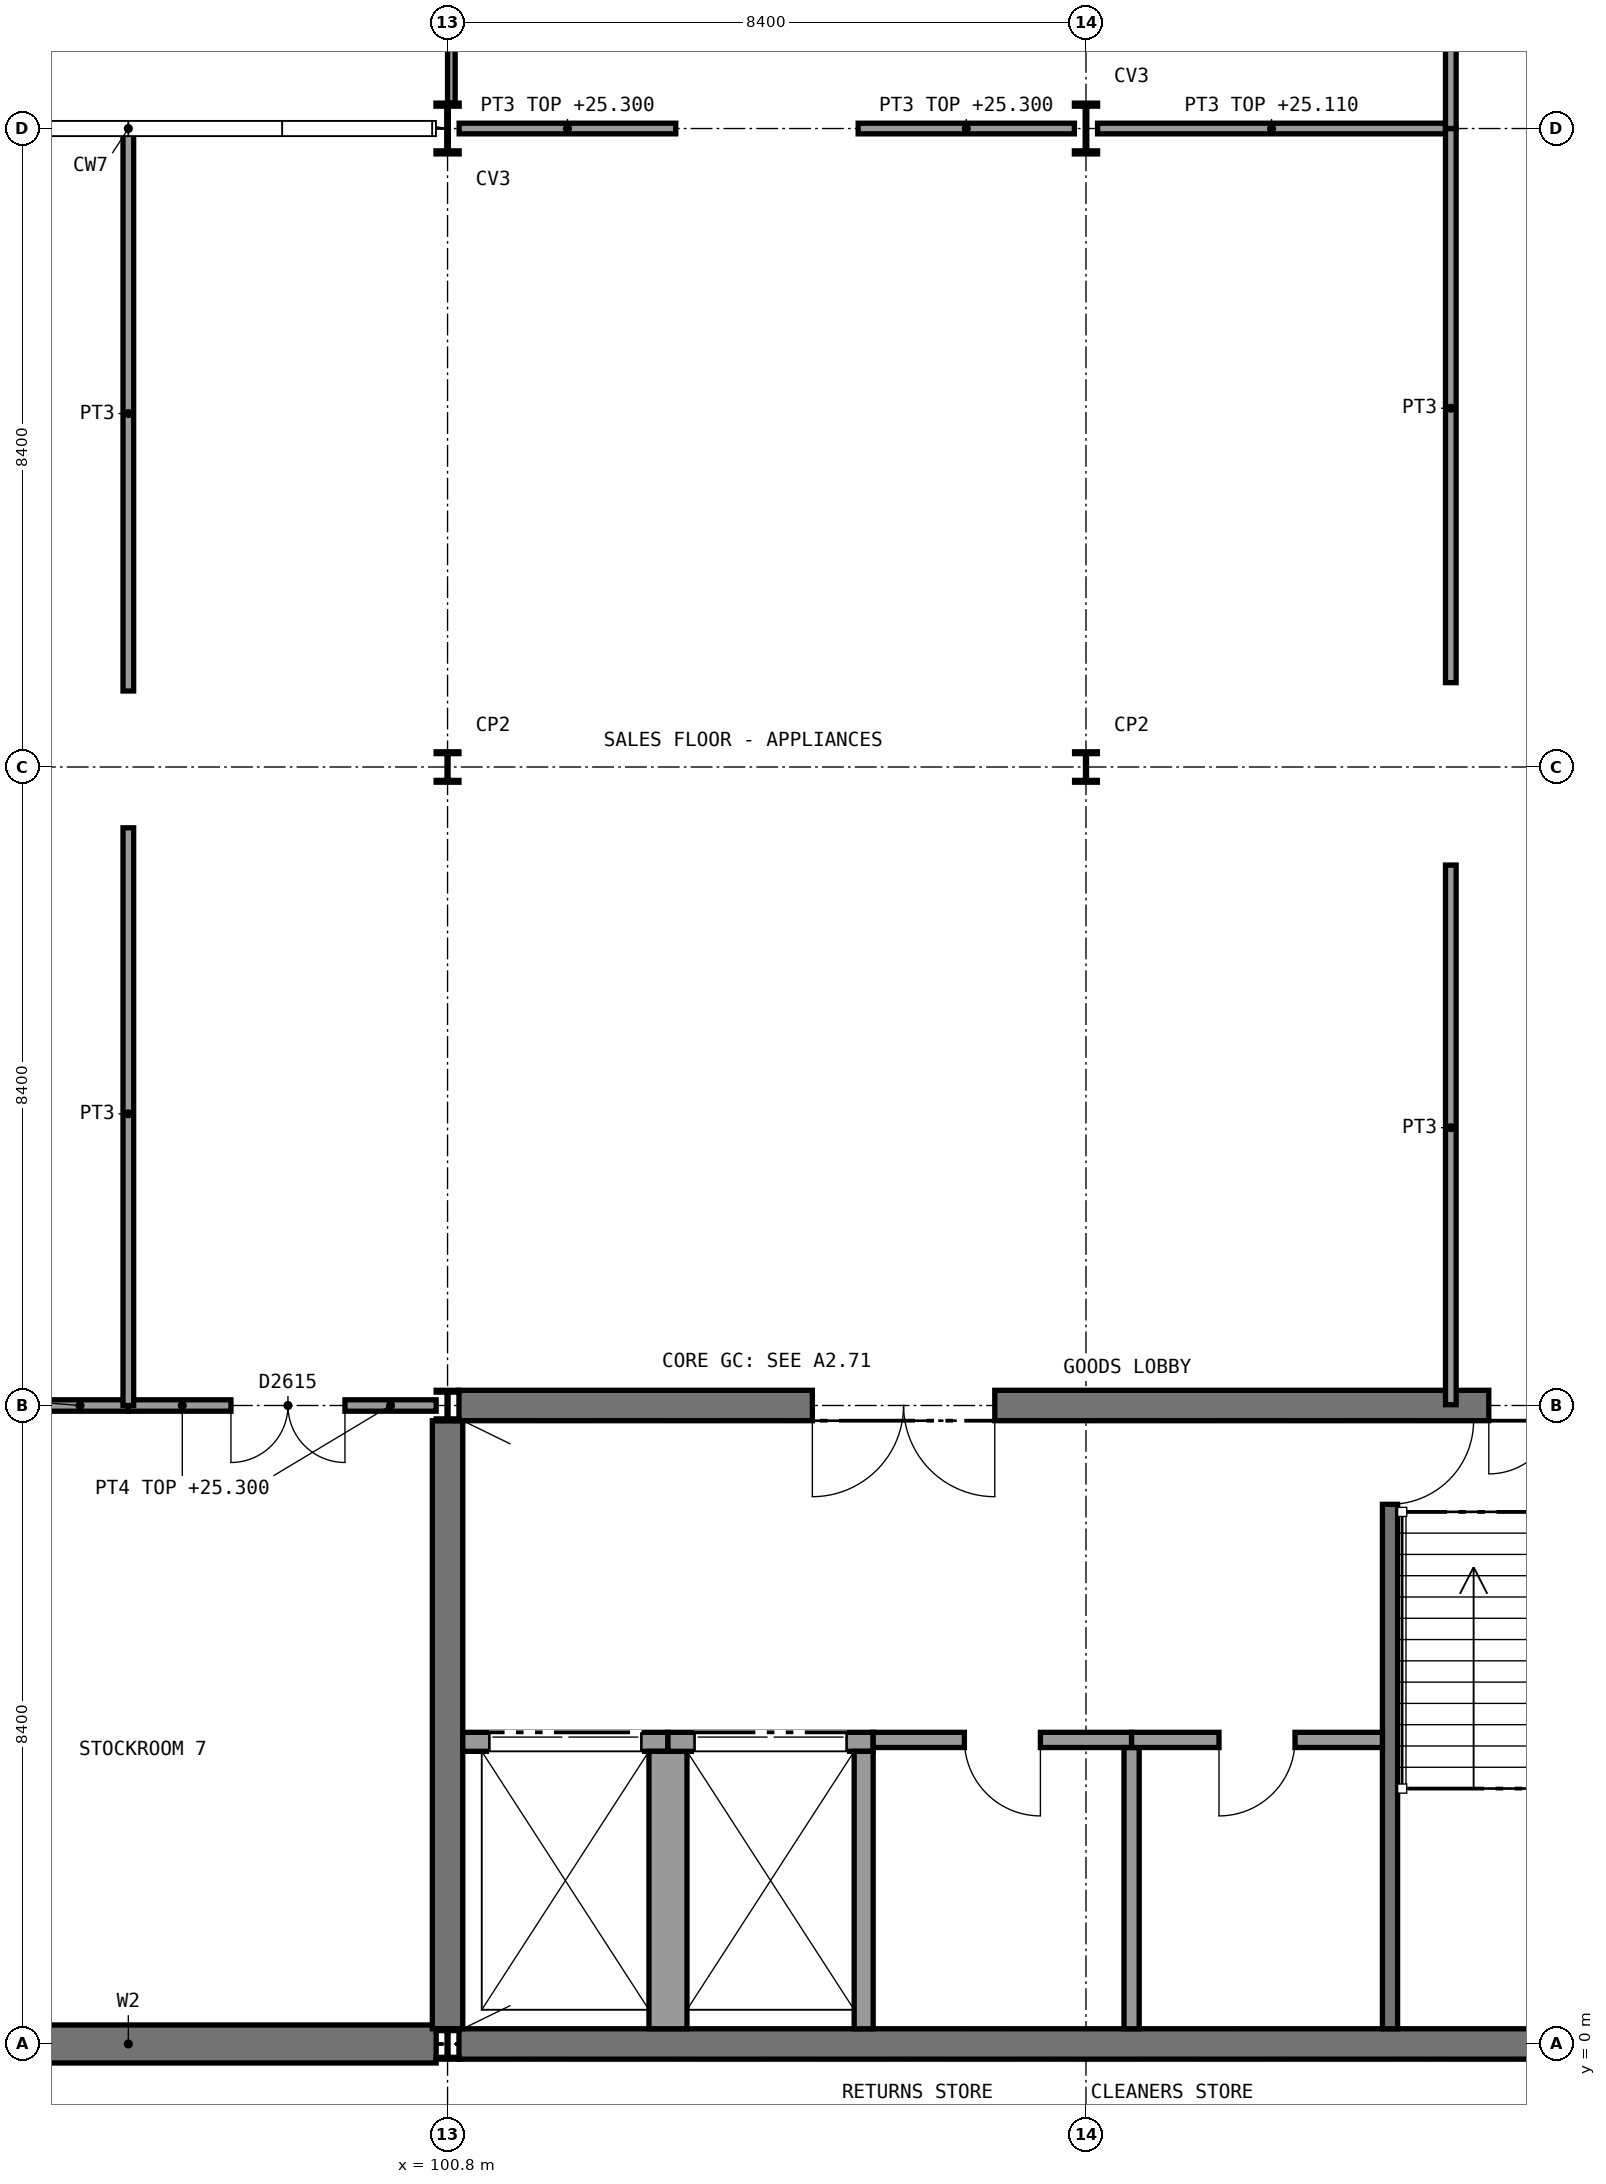
"""IFC4 building model, lengths in metres.
Left out: names, types, materials, properties, quantities, classifications, styles, units other than length and angle.
Written with IfcOpenShell. Run it as: python <this file> out.ifc"""

import sys

from ifc_helpers import new_model, si_unit, direction, frame, frame_2d, origin, origin_2d, place, context, subcontext, project, spatial, rectangle, i_section, extrude, element, fill, save


model = new_model("IFC4")
c1 = context("Model", 3, precision=1e-05, world=origin(), true_north=direction((0.0, 1.0)))
c2 = subcontext(c1, "Body", "Model", "MODEL_VIEW")
j1 = project(units=[si_unit("LENGTHUNIT", "METRE"), si_unit("PLANEANGLEUNIT", "RADIAN")], contexts=[c1])
p1 = place(None, origin())
s1 = spatial("IfcSite", under=j1, at=p1, CompositionType="ELEMENT")
p2 = place(p1, origin())
s2 = spatial("IfcBuilding", under=s1, at=p2, CompositionType="ELEMENT")
p3 = place(p2, frame((0.0, 0.0, 21.0)))
s3 = spatial("IfcBuildingStorey", under=s2, at=p3, CompositionType="ELEMENT", Elevation=21.0)
p4 = place(p3, frame((92.55, 0.0, 0.0), z_axis=(0.0, 0.0, 1.0), x_axis=(1.0, 0.0, 0.0)))
e1 = element("IfcWall", 1, at=p4, inside=s3, PredefinedType="SHEAR", context=c2, shape_type="SweptSolid", body=[
    extrude(rectangle(XDim=8.1, YDim=0.5, at=frame_2d((4.05, 0.0))), origin(), (0.0, 0.0, 1.0), 4.65),
])
p5 = place(p3, frame((100.95, 0.0, 0.0), z_axis=(0.0, 0.0, 1.0), x_axis=(1.0, 0.0, 0.0)))
e2 = element("IfcWall", 2, at=p5, inside=s3, PredefinedType="SHEAR", context=c2, shape_type="SweptSolid", body=[
    extrude(rectangle(XDim=16.45, YDim=0.4, at=frame_2d((8.225, 0.0))), origin(), (0.0, 0.0, 1.0), 4.65),
])
p6 = place(p3, frame((100.95, 8.4, 0.0), z_axis=(0.0, 0.0, 1.0), x_axis=(1.0, 0.0, 0.0)))
e3 = element("IfcWall", 3, at=p6, inside=s3, PredefinedType="SHEAR", context=c2, shape_type="SweptSolid", body=[
    extrude(rectangle(XDim=16.45, YDim=0.4, at=frame_2d((8.225, 0.0))), origin(), (0.0, 0.0, 1.0), 4.65),
])
p7 = place(p6, frame((13.55, 0.0, 0.0)))
e4 = element("IfcOpeningElement", 4, at=p7, cuts=e3, PredefinedType="OPENING", context=c2, shape_type="SweptSolid", body=[
    extrude(rectangle(XDim=1.8, YDim=2.1, at=frame_2d((0.9, 1.05))), frame((0.0, 0.21, 0.0), z_axis=(0.0, -1.0, 0.0), x_axis=(1.0, 0.0, 0.0)), (0.0, 0.0, 1.0), 0.42),
])
p8 = place(p6, frame((4.65, 0.0, 0.0)))
e5 = element("IfcOpeningElement", 5, at=p8, cuts=e3, PredefinedType="OPENING", context=c2, shape_type="SweptSolid", body=[
    extrude(rectangle(XDim=2.4, YDim=2.4, at=frame_2d((1.2, 1.2))), frame((0.0, 0.21, 0.0), z_axis=(0.0, -1.0, 0.0), x_axis=(1.0, 0.0, 0.0)), (0.0, 0.0, 1.0), 0.42),
])
p9 = place(p3, frame((100.8, 0.2, 0.0), z_axis=(0.0, 0.0, 1.0), x_axis=(0.0, 1.0, 0.0)))
e6 = element("IfcWall", 6, at=p9, inside=s3, PredefinedType="SHEAR", context=c2, shape_type="SweptSolid", body=[
    extrude(rectangle(XDim=8.0, YDim=0.4, at=frame_2d((4.0, 0.0))), origin(), (0.0, 0.0, 1.0), 4.65),
])
for number, where, z_axis, x_axis in (
    (7, (100.8, 0.0, 0.0), (0.0, 0.0, 1.0), (1.0, 0.0, 0.0)),
    (8, (100.8, 8.4, 0.0), (0.0, 0.0, 1.0), (1.0, 0.0, 0.0)),
    (9, (100.8, 16.8, 0.0), (0.0, 0.0, 1.0), (1.0, 0.0, 0.0)),
):
    element("IfcColumn", number, at=place(p3, frame(where, z_axis=z_axis, x_axis=x_axis)), inside=s3, PredefinedType="COLUMN", context=c2, shape_type="SweptSolid", body=[
        extrude(i_section(OverallWidth=0.3, OverallDepth=0.4, WebThickness=0.013, FlangeThickness=0.024, FilletRadius=0.027, at=origin_2d()), origin(), (0.0, 0.0, 1.0), 4.8),
    ])
p10 = place(p3, frame((100.8, 25.2, 0.0), z_axis=(0.0, 0.0, 1.0), x_axis=(1.0, 0.0, 0.0)))
e10 = element("IfcColumn", 10, at=p10, inside=s3, PredefinedType="COLUMN", context=c2, shape_type="SweptSolid", body=[
    extrude(i_section(OverallWidth=0.305, OverallDepth=0.668, WebThickness=0.021, FlangeThickness=0.04, FilletRadius=0.027, at=origin_2d()), origin(), (0.0, 0.0, 1.0), 4.8),
])
p11 = place(p3, frame((109.2, 16.8, 0.0), z_axis=(0.0, 0.0, 1.0), x_axis=(1.0, 0.0, 0.0)))
e11 = element("IfcColumn", 11, at=p11, inside=s3, PredefinedType="COLUMN", context=c2, shape_type="SweptSolid", body=[
    extrude(i_section(OverallWidth=0.3, OverallDepth=0.4, WebThickness=0.013, FlangeThickness=0.024, FilletRadius=0.027, at=origin_2d()), origin(), (0.0, 0.0, 1.0), 4.8),
])
p12 = place(p3, frame((109.2, 25.2, 0.0), z_axis=(0.0, 0.0, 1.0), x_axis=(1.0, 0.0, 0.0)))
e12 = element("IfcColumn", 12, at=p12, inside=s3, PredefinedType="COLUMN", context=c2, shape_type="SweptSolid", body=[
    extrude(i_section(OverallWidth=0.305, OverallDepth=0.668, WebThickness=0.021, FlangeThickness=0.04, FilletRadius=0.027, at=origin_2d()), origin(), (0.0, 0.0, 1.0), 4.8),
])
p13 = place(p3, frame((92.55, 8.4, 0.0), z_axis=(0.0, 0.0, 1.0), x_axis=(1.0, 0.0, 0.0)))
e13 = element("IfcWall", 13, at=p13, inside=s3, PredefinedType="SOLIDWALL", context=c2, shape_type="SweptSolid", body=[
    extrude(rectangle(XDim=4.05, YDim=0.15, at=frame_2d((2.025, 0.0))), origin(), (0.0, 0.0, 1.0), 4.3),
])
p14 = place(p13, frame((1.35, 0.0, 0.0)))
e14 = element("IfcOpeningElement", 14, at=p14, cuts=e13, PredefinedType="OPENING", context=c2, shape_type="SweptSolid", body=[
    extrude(rectangle(XDim=1.5, YDim=2.1, at=frame_2d((0.75, 1.05))), frame((0.0, 0.085, 0.0), z_axis=(0.0, -1.0, 0.0), x_axis=(1.0, 0.0, 0.0)), (0.0, 0.0, 1.0), 0.17),
])
p15 = place(p3, frame((96.6, 8.4, 0.0), z_axis=(0.0, 0.0, 1.0), x_axis=(1.0, 0.0, 0.0)))
e15 = element("IfcWall", 15, at=p15, inside=s3, PredefinedType="SOLIDWALL", context=c2, shape_type="SweptSolid", body=[
    extrude(rectangle(XDim=4.05, YDim=0.15, at=frame_2d((2.025, 0.0))), origin(), (0.0, 0.0, 1.0), 4.3),
])
p16 = place(p15, frame((1.35, 0.0, 0.0)))
e16 = element("IfcOpeningElement", 16, at=p16, cuts=e15, PredefinedType="OPENING", context=c2, shape_type="SweptSolid", body=[
    extrude(rectangle(XDim=1.5, YDim=2.1, at=frame_2d((0.75, 1.05))), frame((0.0, 0.085, 0.0), z_axis=(0.0, -1.0, 0.0), x_axis=(1.0, 0.0, 0.0)), (0.0, 0.0, 1.0), 0.17),
])
p17 = place(p3, frame((96.6, 8.4, 0.0), z_axis=(0.0, 0.0, 1.0), x_axis=(0.0, 1.0, 0.0)))
e17 = element("IfcWall", 17, at=p17, inside=s3, PredefinedType="PARTITIONING", context=c2, shape_type="SweptSolid", body=[
    extrude(rectangle(XDim=7.6, YDim=0.14, at=frame_2d((3.8, 0.0))), origin(), (0.0, 0.0, 1.0), 4.65),
])
p18 = place(p3, frame((96.6, 17.8, 0.0), z_axis=(0.0, 0.0, 1.0), x_axis=(0.0, 1.0, 0.0)))
e18 = element("IfcWall", 18, at=p18, inside=s3, PredefinedType="PARTITIONING", context=c2, shape_type="SweptSolid", body=[
    extrude(rectangle(XDim=7.4, YDim=0.14, at=frame_2d((3.7, 0.0))), origin(), (0.0, 0.0, 1.0), 4.65),
])
p19 = place(p3, frame((100.953, 25.2, 0.0), z_axis=(0.0, 0.0, 1.0), x_axis=(1.0, 0.0, 0.0)))
e19 = element("IfcWall", 19, at=p19, inside=s3, PredefinedType="PARTITIONING", context=c2, shape_type="SweptSolid", body=[
    extrude(rectangle(XDim=2.85, YDim=0.14, at=frame_2d((1.425, 0.0))), origin(), (0.0, 0.0, 1.0), 4.3),
])
p20 = place(p3, frame((106.203, 25.2, 0.0), z_axis=(0.0, 0.0, 1.0), x_axis=(1.0, 0.0, 0.0)))
e20 = element("IfcWall", 20, at=p20, inside=s3, PredefinedType="PARTITIONING", context=c2, shape_type="SweptSolid", body=[
    extrude(rectangle(XDim=2.845, YDim=0.14, at=frame_2d((1.422, 0.0))), origin(), (0.0, 0.0, 1.0), 4.3),
])
p21 = place(p3, frame((109.353, 25.2, 0.0), z_axis=(0.0, 0.0, 1.0), x_axis=(1.0, 0.0, 0.0)))
e21 = element("IfcWall", 21, at=p21, inside=s3, PredefinedType="PARTITIONING", context=c2, shape_type="SweptSolid", body=[
    extrude(rectangle(XDim=4.647, YDim=0.14, at=frame_2d((2.324, 0.0))), origin(), (0.0, 0.0, 1.0), 4.11),
])
p22 = place(p3, frame((114.0, 8.41, 0.0), z_axis=(0.0, 0.0, 1.0), x_axis=(0.0, 1.0, 0.0)))
e22 = element("IfcWall", 22, at=p22, inside=s3, PredefinedType="PARTITIONING", context=c2, shape_type="SweptSolid", body=[
    extrude(rectangle(XDim=7.1, YDim=0.14, at=frame_2d((3.55, 0.0))), origin(), (0.0, 0.0, 1.0), 4.65),
])
p23 = place(p3, frame((114.0, 17.91, 0.0), z_axis=(0.0, 0.0, 1.0), x_axis=(0.0, 1.0, 0.0)))
e23 = element("IfcWall", 23, at=p23, inside=s3, PredefinedType="PARTITIONING", context=c2, shape_type="SweptSolid", body=[
    extrude(rectangle(XDim=7.29, YDim=0.14, at=frame_2d((3.645, 0.0))), origin(), (0.0, 0.0, 1.0), 4.65),
])
p24 = place(p3, frame((114.0, 25.2, 0.0), z_axis=(0.0, 0.0, 1.0), x_axis=(0.0, 1.0, 0.0)))
e24 = element("IfcWall", 24, at=p24, inside=s3, PredefinedType="PARTITIONING", context=c2, shape_type="SweptSolid", body=[
    extrude(rectangle(XDim=12.6, YDim=0.14, at=frame_2d((6.3, 0.0))), origin(), (0.0, 0.0, 1.0), 4.65),
])
p25 = place(p3, frame((113.2, 0.2, 0.0), z_axis=(0.0, 0.0, 1.0), x_axis=(0.0, 1.0, 0.0)))
e25 = element("IfcWall", 25, at=p25, inside=s3, PredefinedType="SHEAR", context=c2, shape_type="SweptSolid", body=[
    extrude(rectangle(XDim=8.0, YDim=0.2, at=frame_2d((4.0, 0.0))), origin(), (0.0, 0.0, 1.0), 4.65),
])
p26 = place(p25, frame((6.9, 0.0, 0.0)))
e26 = element("IfcOpeningElement", 26, at=p26, cuts=e25, PredefinedType="OPENING", context=c2, shape_type="SweptSolid", body=[
    extrude(rectangle(XDim=1.11, YDim=2.1, at=frame_2d((0.555, 1.05))), frame((0.0, 0.11, 0.0), z_axis=(0.0, -1.0, 0.0), x_axis=(1.0, 0.0, 0.0)), (0.0, 0.0, 1.0), 0.22),
])
p27 = place(p3, frame((101.0, 3.975, 0.0), z_axis=(0.0, 0.0, 1.0), x_axis=(1.0, 0.0, 0.0)))
e27 = element("IfcWall", 27, at=p27, inside=s3, PredefinedType="SOLIDWALL", context=c2, shape_type="SweptSolid", body=[
    extrude(rectangle(XDim=2.7, YDim=0.25, at=frame_2d((1.35, 0.0))), origin(), (0.0, 0.0, 1.0), 4.8),
])
p28 = place(p27, frame((0.35, 0.0, 0.0)))
e28 = element("IfcOpeningElement", 28, at=p28, cuts=e27, PredefinedType="OPENING", context=c2, shape_type="SweptSolid", body=[
    extrude(rectangle(XDim=2.0, YDim=2.2, at=frame_2d((1.0, 1.1))), frame((0.0, 0.135, 0.0), z_axis=(0.0, -1.0, 0.0), x_axis=(1.0, 0.0, 0.0)), (0.0, 0.0, 1.0), 0.27),
])
p29 = place(p3, frame((103.7, 0.2, 0.0), z_axis=(0.0, 0.0, 1.0), x_axis=(0.0, 1.0, 0.0)))
e29 = element("IfcWall", 29, at=p29, inside=s3, PredefinedType="SOLIDWALL", context=c2, shape_type="SweptSolid", body=[
    extrude(rectangle(XDim=3.65, YDim=0.5, at=frame_2d((1.825, 0.0))), origin(), (0.0, 0.0, 1.0), 4.8),
])
p30 = place(p3, frame((103.7, 3.975, 0.0), z_axis=(0.0, 0.0, 1.0), x_axis=(1.0, 0.0, 0.0)))
e30 = element("IfcWall", 30, at=p30, inside=s3, PredefinedType="SOLIDWALL", context=c2, shape_type="SweptSolid", body=[
    extrude(rectangle(XDim=2.7, YDim=0.25, at=frame_2d((1.35, 0.0))), origin(), (0.0, 0.0, 1.0), 4.8),
])
p31 = place(p30, frame((0.35, 0.0, 0.0)))
e31 = element("IfcOpeningElement", 31, at=p31, cuts=e30, PredefinedType="OPENING", context=c2, shape_type="SweptSolid", body=[
    extrude(rectangle(XDim=2.0, YDim=2.2, at=frame_2d((1.0, 1.1))), frame((0.0, 0.135, 0.0), z_axis=(0.0, -1.0, 0.0), x_axis=(1.0, 0.0, 0.0)), (0.0, 0.0, 1.0), 0.27),
])
p32 = place(p3, frame((106.275, 0.2, 0.0), z_axis=(0.0, 0.0, 1.0), x_axis=(0.0, 1.0, 0.0)))
e32 = element("IfcWall", 32, at=p32, inside=s3, PredefinedType="SOLIDWALL", context=c2, shape_type="SweptSolid", body=[
    extrude(rectangle(XDim=3.65, YDim=0.25, at=frame_2d((1.825, 0.0))), origin(), (0.0, 0.0, 1.0), 4.8),
])
p33 = place(p3, frame((106.4, 4.0, 0.0), z_axis=(0.0, 0.0, 1.0), x_axis=(1.0, 0.0, 0.0)))
e33 = element("IfcWall", 33, at=p33, inside=s3, PredefinedType="PARTITIONING", context=c2, shape_type="SweptSolid", body=[
    extrude(rectangle(XDim=3.4, YDim=0.2, at=frame_2d((1.7, 0.0))), origin(), (0.0, 0.0, 1.0), 4.65),
])
p34 = place(p33, frame((1.2, 0.0, 0.0)))
e34 = element("IfcOpeningElement", 34, at=p34, cuts=e33, PredefinedType="OPENING", context=c2, shape_type="SweptSolid", body=[
    extrude(rectangle(XDim=1.0, YDim=2.1, at=frame_2d((0.5, 1.05))), frame((0.0, 0.11, 0.0), z_axis=(0.0, -1.0, 0.0), x_axis=(1.0, 0.0, 0.0)), (0.0, 0.0, 1.0), 0.22),
])
p35 = place(p3, frame((109.8, 0.2, 0.0), z_axis=(0.0, 0.0, 1.0), x_axis=(0.0, 1.0, 0.0)))
e35 = element("IfcWall", 35, at=p35, inside=s3, PredefinedType="PARTITIONING", context=c2, shape_type="SweptSolid", body=[
    extrude(rectangle(XDim=3.7, YDim=0.2, at=frame_2d((1.85, 0.0))), origin(), (0.0, 0.0, 1.0), 4.65),
])
p36 = place(p3, frame((109.8, 4.0, 0.0), z_axis=(0.0, 0.0, 1.0), x_axis=(1.0, 0.0, 0.0)))
e36 = element("IfcWall", 36, at=p36, inside=s3, PredefinedType="PARTITIONING", context=c2, shape_type="SweptSolid", body=[
    extrude(rectangle(XDim=3.3, YDim=0.2, at=frame_2d((1.65, 0.0))), origin(), (0.0, 0.0, 1.0), 4.65),
])
p37 = place(p36, frame((1.15, 0.0, 0.0)))
e37 = element("IfcOpeningElement", 37, at=p37, cuts=e36, PredefinedType="OPENING", context=c2, shape_type="SweptSolid", body=[
    extrude(rectangle(XDim=1.0, YDim=2.1, at=frame_2d((0.5, 1.05))), frame((0.0, 0.11, 0.0), z_axis=(0.0, -1.0, 0.0), x_axis=(1.0, 0.0, 0.0)), (0.0, 0.0, 1.0), 0.22),
])
p38 = place(p3, frame((100.85, 25.534, 0.0), z_axis=(0.0, 0.0, 1.0), x_axis=(0.0, 1.0, 0.0)))
e38 = element("IfcWall", 38, at=p38, inside=s3, PredefinedType="PARTITIONING", context=c2, shape_type="SweptSolid", body=[
    extrude(rectangle(XDim=12.027, YDim=0.1, at=frame_2d((6.014, 0.0))), origin(), (0.0, 0.0, 1.0), 3.76),
])
p39 = place(p16, frame((1.5, 0.0, 0.0), z_axis=(0.0, 0.0, 1.0), x_axis=(-1.0, 0.0, 0.0)))
e39 = element("IfcDoor", 39, at=p39, inside=s3, OperationType="DOUBLE_DOOR_SINGLE_SWING", PredefinedType="DOOR", context=c2, shape_type="SweptSolid", body=[
    extrude(rectangle(XDim=1.5, YDim=2.1, at=frame_2d((0.75, 1.05))), frame((0.0, 0.025, 0.0), z_axis=(0.0, -1.0, 0.0), x_axis=(1.0, 0.0, 0.0)), (0.0, 0.0, 1.0), 0.05),
])
fill(e16, e39)
p40 = place(p26, frame((1.1, 0.0, 0.0), z_axis=(0.0, 0.0, 1.0), x_axis=(-1.0, 0.0, 0.0)))
e40 = element("IfcDoor", 40, at=p40, inside=s3, OperationType="SINGLE_SWING_LEFT", PredefinedType="DOOR", context=c2, shape_type="SweptSolid", body=[
    extrude(rectangle(XDim=1.1, YDim=2.1, at=frame_2d((0.55, 1.05))), frame((0.0, 0.025, 0.0), z_axis=(0.0, -1.0, 0.0), x_axis=(1.0, 0.0, 0.0)), (0.0, 0.0, 1.0), 0.05),
])
fill(e26, e40)
p41 = place(p28, origin())
e41 = element("IfcDoor", 41, at=p41, inside=s3, OperationType="DOUBLE_DOOR_SLIDING", PredefinedType="DOOR", context=c2, shape_type="SweptSolid", body=[
    extrude(rectangle(XDim=2.0, YDim=2.2, at=frame_2d((1.0, 1.1))), frame((0.0, 0.025, 0.0), z_axis=(0.0, -1.0, 0.0), x_axis=(1.0, 0.0, 0.0)), (0.0, 0.0, 1.0), 0.05),
])
fill(e28, e41)
p42 = place(p31, origin())
e42 = element("IfcDoor", 42, at=p42, inside=s3, OperationType="DOUBLE_DOOR_SLIDING", PredefinedType="DOOR", context=c2, shape_type="SweptSolid", body=[
    extrude(rectangle(XDim=2.0, YDim=2.2, at=frame_2d((1.0, 1.1))), frame((0.0, 0.025, 0.0), z_axis=(0.0, -1.0, 0.0), x_axis=(1.0, 0.0, 0.0)), (0.0, 0.0, 1.0), 0.05),
])
fill(e31, e42)
p43 = place(p34, frame((1.0, 0.0, 0.0), z_axis=(0.0, 0.0, 1.0), x_axis=(-1.0, 0.0, 0.0)))
e43 = element("IfcDoor", 43, at=p43, inside=s3, OperationType="SINGLE_SWING_LEFT", PredefinedType="DOOR", context=c2, shape_type="SweptSolid", body=[
    extrude(rectangle(XDim=1.0, YDim=2.1, at=frame_2d((0.5, 1.05))), frame((0.0, 0.025, 0.0), z_axis=(0.0, -1.0, 0.0), x_axis=(1.0, 0.0, 0.0)), (0.0, 0.0, 1.0), 0.05),
])
fill(e34, e43)
p44 = place(p37, frame((1.0, 0.0, 0.0), z_axis=(0.0, 0.0, 1.0), x_axis=(-1.0, 0.0, 0.0)))
e44 = element("IfcDoor", 44, at=p44, inside=s3, OperationType="SINGLE_SWING_RIGHT", PredefinedType="DOOR", context=c2, shape_type="SweptSolid", body=[
    extrude(rectangle(XDim=1.0, YDim=2.1, at=frame_2d((0.5, 1.05))), frame((0.0, 0.025, 0.0), z_axis=(0.0, -1.0, 0.0), x_axis=(1.0, 0.0, 0.0)), (0.0, 0.0, 1.0), 0.05),
])
fill(e37, e44)
p45 = place(p7, frame((1.8, 0.0, 0.0), z_axis=(0.0, 0.0, 1.0), x_axis=(-1.0, 0.0, 0.0)))
e45 = element("IfcDoor", 45, at=p45, inside=s3, OperationType="DOUBLE_DOOR_SINGLE_SWING", PredefinedType="DOOR", context=c2, shape_type="SweptSolid", body=[
    extrude(rectangle(XDim=1.8, YDim=2.1, at=frame_2d((0.9, 1.05))), frame((0.0, 0.025, 0.0), z_axis=(0.0, -1.0, 0.0), x_axis=(1.0, 0.0, 0.0)), (0.0, 0.0, 1.0), 0.05),
])
fill(e4, e45)
p46 = place(p8, frame((2.4, 0.0, 0.0), z_axis=(0.0, 0.0, 1.0), x_axis=(-1.0, 0.0, 0.0)))
e46 = element("IfcDoor", 46, at=p46, inside=s3, OperationType="DOUBLE_DOOR_SINGLE_SWING", PredefinedType="DOOR", context=c2, shape_type="SweptSolid", body=[
    extrude(rectangle(XDim=2.4, YDim=2.4, at=frame_2d((1.2, 1.2))), frame((0.0, 0.025, 0.0), z_axis=(0.0, -1.0, 0.0), x_axis=(1.0, 0.0, 0.0)), (0.0, 0.0, 1.0), 0.05),
])
fill(e5, e46)
save(model, sys.argv[1])
